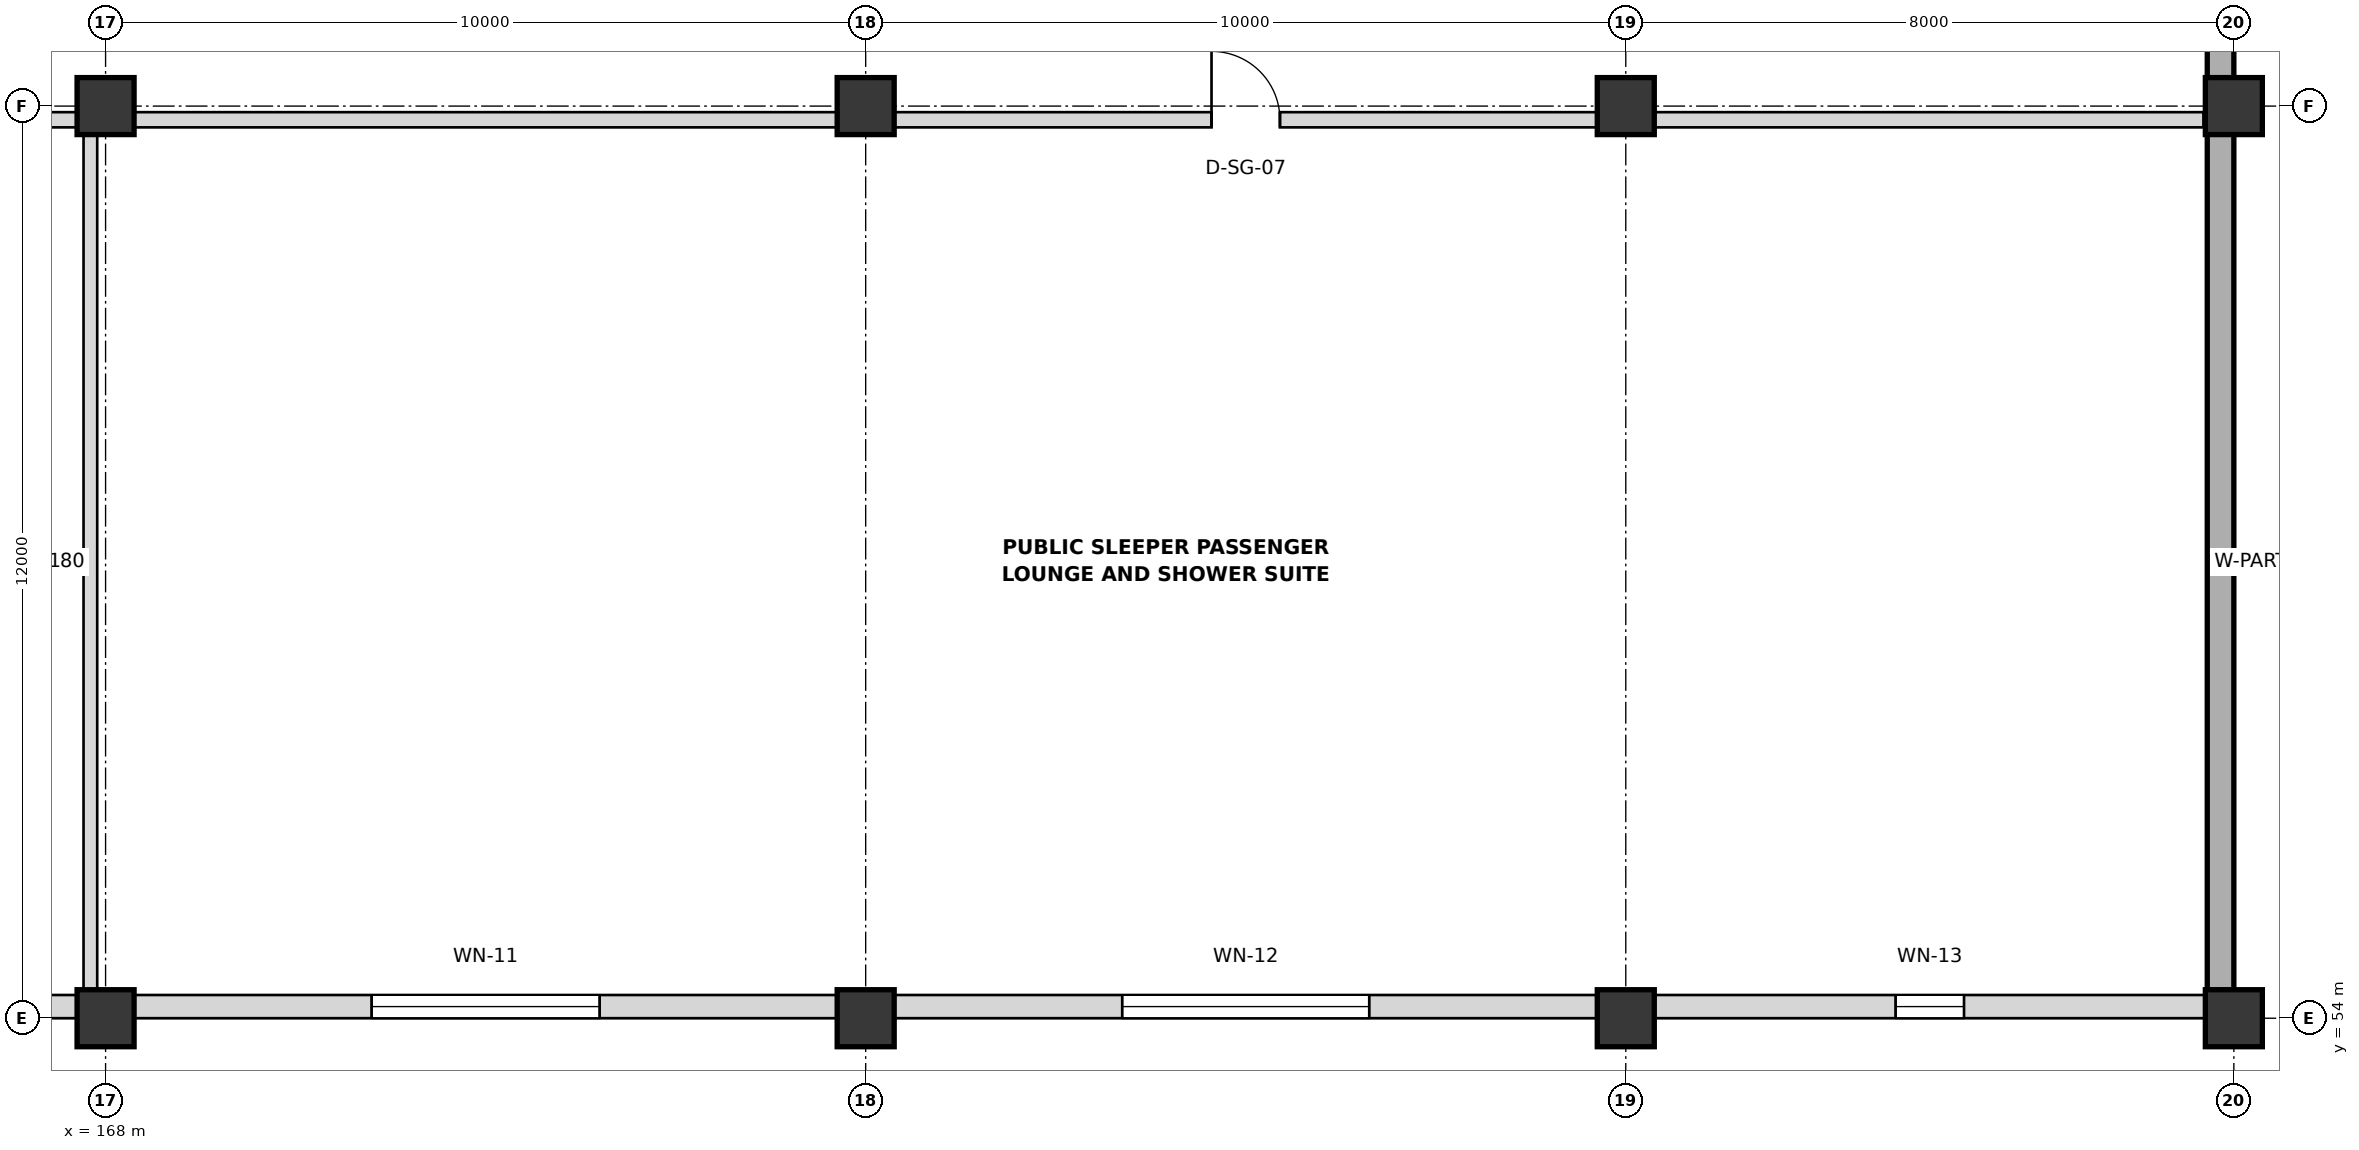
"""IFC4 building model, lengths in metres.
Left out: names, types, materials, properties, quantities, classifications, styles, units other than length and angle.
Written with IfcOpenShell. Run it as: python <this file> out.ifc"""

import sys

from ifc_helpers import new_model, si_unit, direction, frame, frame_2d, origin, origin_2d, place, context, subcontext, project, spatial, rectangle, extrude, element, fill, save


model = new_model("IFC4")
c1 = context("Model", 3, precision=1e-05, world=origin(), true_north=direction((0.0, 1.0)))
c2 = subcontext(c1, "Body", "Model", "MODEL_VIEW")
j1 = project(units=[si_unit("LENGTHUNIT", "METRE"), si_unit("PLANEANGLEUNIT", "RADIAN")], contexts=[c1])
p1 = place(None, origin())
s1 = spatial("IfcSite", under=j1, at=p1, CompositionType="ELEMENT")
p2 = place(p1, origin())
s2 = spatial("IfcBuilding", under=s1, at=p2, CompositionType="ELEMENT")
p3 = place(p2, frame((0.0, 0.0, 9.6)))
s3 = spatial("IfcBuildingStorey", under=s2, at=p3, CompositionType="ELEMENT", Elevation=9.6)
for number, where, z_axis, x_axis in (
    (1, (168.0, 54.0, 0.0), (0.0, 0.0, 1.0), (1.0, 0.0, 0.0)),
    (2, (168.0, 66.0, 0.0), (0.0, 0.0, 1.0), (1.0, 0.0, 0.0)),
    (3, (178.0, 54.0, 0.0), (0.0, 0.0, 1.0), (1.0, 0.0, 0.0)),
    (4, (178.0, 66.0, 0.0), (0.0, 0.0, 1.0), (1.0, 0.0, 0.0)),
    (5, (188.0, 54.0, 0.0), (0.0, 0.0, 1.0), (1.0, 0.0, 0.0)),
    (6, (188.0, 66.0, 0.0), (0.0, 0.0, 1.0), (1.0, 0.0, 0.0)),
    (7, (196.0, 54.0, 0.0), (0.0, 0.0, 1.0), (1.0, 0.0, 0.0)),
    (8, (196.0, 66.0, 0.0), (0.0, 0.0, 1.0), (1.0, 0.0, 0.0)),
):
    element("IfcColumn", number, at=place(p3, frame(where, z_axis=z_axis, x_axis=x_axis)), inside=s3, PredefinedType="COLUMN", context=c2, shape_type="SweptSolid", body=[
        extrude(rectangle(XDim=0.75, YDim=0.75, at=origin_2d()), origin(), (0.0, 0.0, 1.0), 4.8),
    ])
for number, where, z_axis, x_axis in (
    (9, (195.825, 65.63, 0.0), (0.0, 0.0, 1.0), (0.0, -1.0, 0.0)),
    (10, (195.825, 77.63, 0.0), (0.0, 0.0, 1.0), (0.0, -1.0, 0.0)),
):
    element("IfcWall", number, at=place(p3, frame(where, z_axis=z_axis, x_axis=x_axis)), inside=s3, PredefinedType="SOLIDWALL", context=c2, shape_type="SweptSolid", body=[
        extrude(rectangle(XDim=11.26, YDim=0.35, at=frame_2d((5.63, 0.0))), origin(), (0.0, 0.0, 1.0), 4.8),
    ])
p4 = place(p3, frame((167.63, 54.153, 0.0), z_axis=(0.0, 0.0, 1.0), x_axis=(-1.0, 0.0, 0.0)))
e11 = element("IfcWall", 11, at=p4, inside=s3, PredefinedType="SOLIDWALL", context=c2, shape_type="SweptSolid", body=[
    extrude(rectangle(XDim=9.26, YDim=0.305, at=frame_2d((4.63, 0.0))), origin(), (0.0, 0.0, 1.0), 3.758),
])
p5 = place(p4, frame((3.255, 0.0, 1.0)))
e12 = element("IfcOpeningElement", 12, at=p5, cuts=e11, PredefinedType="OPENING", context=c2, shape_type="SweptSolid", body=[
    extrude(rectangle(XDim=2.75, YDim=1.15, at=frame_2d((1.375, 0.575))), frame((0.0, 0.162, 0.0), z_axis=(0.0, -1.0, 0.0), x_axis=(1.0, 0.0, 0.0)), (0.0, 0.0, 1.0), 0.325),
])
p6 = place(p3, frame((177.63, 54.153, 0.0), z_axis=(0.0, 0.0, 1.0), x_axis=(-1.0, 0.0, 0.0)))
e13 = element("IfcWall", 13, at=p6, inside=s3, PredefinedType="SOLIDWALL", context=c2, shape_type="SweptSolid", body=[
    extrude(rectangle(XDim=9.26, YDim=0.305, at=frame_2d((4.63, 0.0))), origin(), (0.0, 0.0, 1.0), 3.758),
])
p7 = place(p6, frame((3.13, 0.0, 1.0)))
e14 = element("IfcOpeningElement", 14, at=p7, cuts=e13, PredefinedType="OPENING", context=c2, shape_type="SweptSolid", body=[
    extrude(rectangle(XDim=3.0, YDim=1.15, at=frame_2d((1.5, 0.575))), frame((0.0, 0.162, 0.0), z_axis=(0.0, -1.0, 0.0), x_axis=(1.0, 0.0, 0.0)), (0.0, 0.0, 1.0), 0.325),
])
p8 = place(p3, frame((187.63, 54.153, 0.0), z_axis=(0.0, 0.0, 1.0), x_axis=(-1.0, 0.0, 0.0)))
e15 = element("IfcWall", 15, at=p8, inside=s3, PredefinedType="SOLIDWALL", context=c2, shape_type="SweptSolid", body=[
    extrude(rectangle(XDim=9.26, YDim=0.305, at=frame_2d((4.63, 0.0))), origin(), (0.0, 0.0, 1.0), 3.758),
])
p9 = place(p8, frame((3.005, 0.0, 1.0)))
e16 = element("IfcOpeningElement", 16, at=p9, cuts=e15, PredefinedType="OPENING", context=c2, shape_type="SweptSolid", body=[
    extrude(rectangle(XDim=3.25, YDim=1.15, at=frame_2d((1.625, 0.575))), frame((0.0, 0.162, 0.0), z_axis=(0.0, -1.0, 0.0), x_axis=(1.0, 0.0, 0.0)), (0.0, 0.0, 1.0), 0.325),
])
p10 = place(p3, frame((195.63, 54.153, 0.0), z_axis=(0.0, 0.0, 1.0), x_axis=(-1.0, 0.0, 0.0)))
e17 = element("IfcWall", 17, at=p10, inside=s3, PredefinedType="SOLIDWALL", context=c2, shape_type="SweptSolid", body=[
    extrude(rectangle(XDim=7.26, YDim=0.305, at=frame_2d((3.63, 0.0))), origin(), (0.0, 0.0, 1.0), 3.758),
])
p11 = place(p10, frame((3.18, 0.0, 1.0)))
e18 = element("IfcOpeningElement", 18, at=p11, cuts=e17, PredefinedType="OPENING", context=c2, shape_type="SweptSolid", body=[
    extrude(rectangle(XDim=0.9, YDim=1.4, at=frame_2d((0.45, 0.7))), frame((0.0, 0.162, 0.0), z_axis=(0.0, -1.0, 0.0), x_axis=(1.0, 0.0, 0.0)), (0.0, 0.0, 1.0), 0.325),
])
p12 = place(p3, frame((128.3, 65.82, 0.0), z_axis=(0.0, 0.0, 1.0), x_axis=(1.0, 0.0, 0.0)))
e19 = element("IfcWall", 19, at=p12, inside=s3, PredefinedType="PARTITIONING", context=c2, shape_type="SweptSolid", body=[
    extrude(rectangle(XDim=39.4, YDim=0.2, at=frame_2d((19.7, 0.0))), origin(), (0.0, 0.0, 1.0), 3.658),
])
p13 = place(p12, frame((13.9, 0.0, 0.0)))
e20 = element("IfcOpeningElement", 20, at=p13, cuts=e19, PredefinedType="OPENING", context=c2, shape_type="SweptSolid", body=[
    extrude(rectangle(XDim=1.6, YDim=2.15, at=frame_2d((0.8, 1.075))), frame((0.0, 0.11, 0.0), z_axis=(0.0, -1.0, 0.0), x_axis=(1.0, 0.0, 0.0)), (0.0, 0.0, 1.0), 0.22),
])
p14 = place(p3, frame((167.8, 54.3, 0.0), z_axis=(0.0, 0.0, 1.0), x_axis=(0.0, 1.0, 0.0)))
e21 = element("IfcWall", 21, at=p14, inside=s3, PredefinedType="PARTITIONING", context=c2, shape_type="SweptSolid", body=[
    extrude(rectangle(XDim=11.4, YDim=0.18, at=frame_2d((5.7, 0.0))), origin(), (0.0, 0.0, 1.0), 3.658),
])
p15 = place(p3, frame((168.3, 65.82, 0.0), z_axis=(0.0, 0.0, 1.0), x_axis=(1.0, 0.0, 0.0)))
e22 = element("IfcWall", 22, at=p15, inside=s3, PredefinedType="PARTITIONING", context=c2, shape_type="SweptSolid", body=[
    extrude(rectangle(XDim=27.3, YDim=0.2, at=frame_2d((13.65, 0.0))), origin(), (0.0, 0.0, 1.0), 3.658),
])
p16 = place(p15, frame((14.25, 0.0, 0.0)))
e23 = element("IfcOpeningElement", 23, at=p16, cuts=e22, PredefinedType="OPENING", context=c2, shape_type="SweptSolid", body=[
    extrude(rectangle(XDim=0.9, YDim=2.2, at=frame_2d((0.45, 1.1))), frame((0.0, 0.11, 0.0), z_axis=(0.0, -1.0, 0.0), x_axis=(1.0, 0.0, 0.0)), (0.0, 0.0, 1.0), 0.22),
])
p17 = place(p7, origin())
e24 = element("IfcWindow", 24, at=p17, inside=s3, PartitioningType="SINGLE_PANEL", PredefinedType="WINDOW", context=c2, shape_type="SweptSolid", body=[
    extrude(rectangle(XDim=3.0, YDim=1.15, at=frame_2d((1.5, 0.575))), frame((0.0, 0.03, 0.0), z_axis=(0.0, -1.0, 0.0), x_axis=(1.0, 0.0, 0.0)), (0.0, 0.0, 1.0), 0.06),
])
fill(e14, e24)
p18 = place(p9, origin())
e25 = element("IfcWindow", 25, at=p18, inside=s3, PartitioningType="SINGLE_PANEL", PredefinedType="WINDOW", context=c2, shape_type="SweptSolid", body=[
    extrude(rectangle(XDim=3.25, YDim=1.15, at=frame_2d((1.625, 0.575))), frame((0.0, 0.03, 0.0), z_axis=(0.0, -1.0, 0.0), x_axis=(1.0, 0.0, 0.0)), (0.0, 0.0, 1.0), 0.06),
])
fill(e16, e25)
p19 = place(p11, origin())
e26 = element("IfcWindow", 26, at=p19, inside=s3, PartitioningType="SINGLE_PANEL", PredefinedType="WINDOW", context=c2, shape_type="SweptSolid", body=[
    extrude(rectangle(XDim=0.9, YDim=1.4, at=frame_2d((0.45, 0.7))), frame((0.0, 0.03, 0.0), z_axis=(0.0, -1.0, 0.0), x_axis=(1.0, 0.0, 0.0)), (0.0, 0.0, 1.0), 0.06),
])
fill(e18, e26)
p20 = place(p16, origin())
e27 = element("IfcDoor", 27, at=p20, inside=s3, OperationType="SINGLE_SWING_LEFT", PredefinedType="DOOR", context=c2, shape_type="SweptSolid", body=[
    extrude(rectangle(XDim=0.9, YDim=2.2, at=frame_2d((0.45, 1.1))), frame((0.0, 0.025, 0.0), z_axis=(0.0, -1.0, 0.0), x_axis=(1.0, 0.0, 0.0)), (0.0, 0.0, 1.0), 0.05),
])
fill(e23, e27)
save(model, sys.argv[1])
